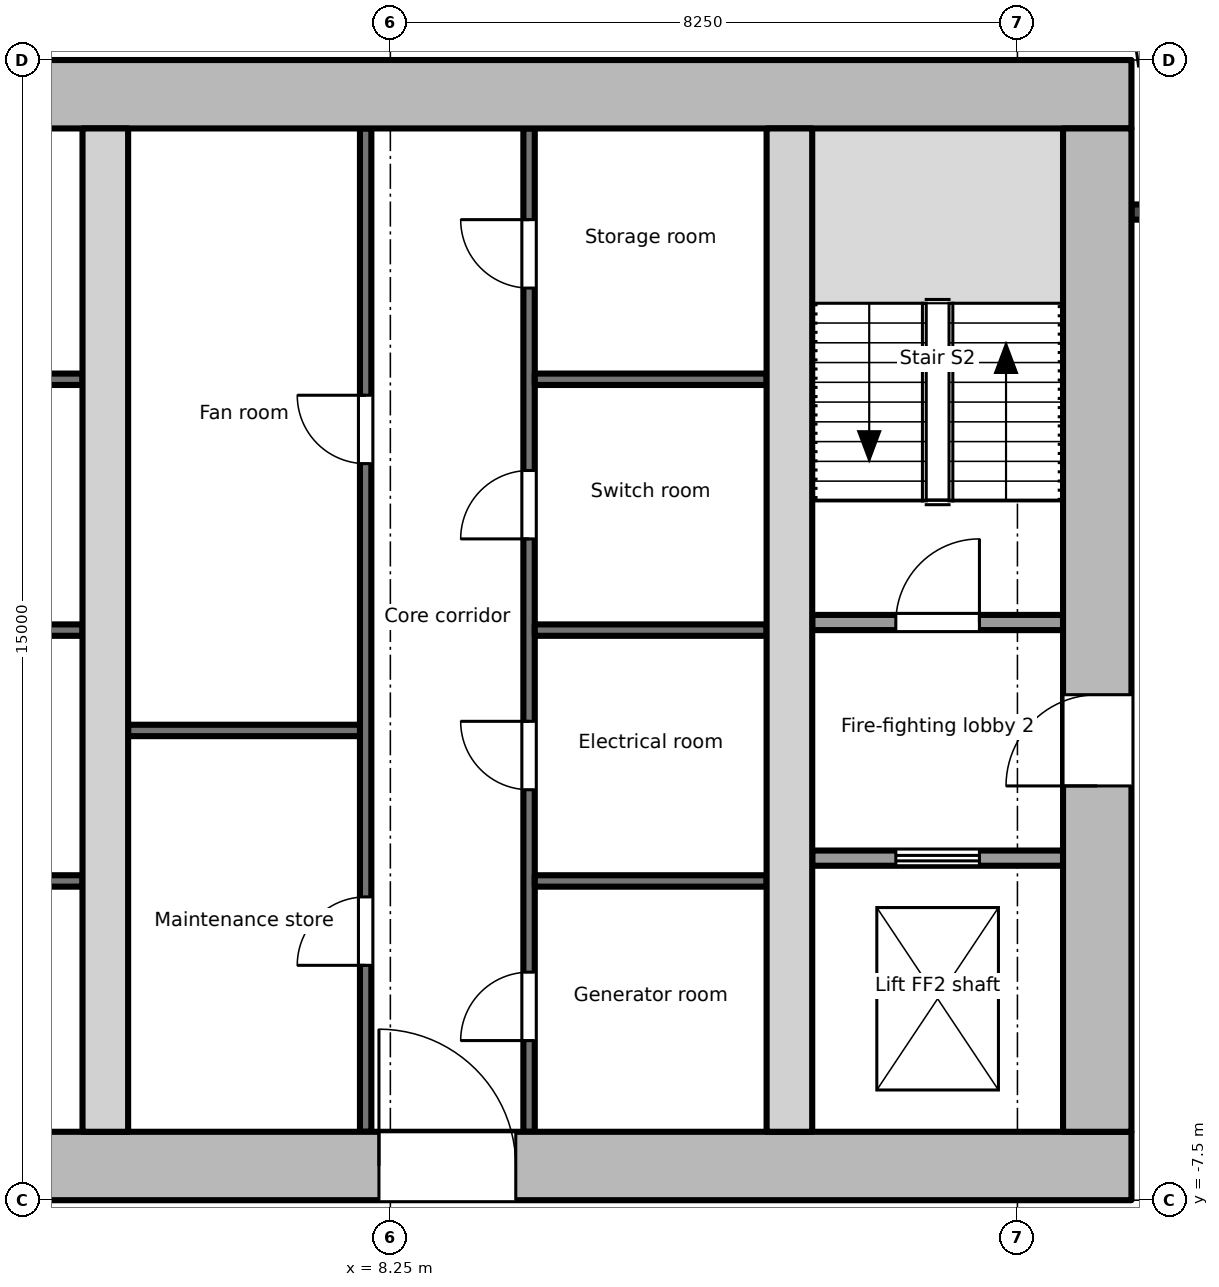
"""IFC4 building model, lengths in metres.
Left out: names, types, materials, properties, quantities, classifications, styles, units other than length and angle.
Written with IfcOpenShell. Run it as: python <this file> out.ifc"""

import sys

from ifc_helpers import new_model, si_unit, direction, frame, frame_2d, origin, place, context, subcontext, project, spatial, rectangle, extrude, element, fill, save


model = new_model("IFC4")
c1 = context("Model", 3, precision=1e-05, world=origin(), true_north=direction((0.0, 1.0)))
c2 = subcontext(c1, "Body", "Model", "MODEL_VIEW")
j1 = project(units=[si_unit("LENGTHUNIT", "METRE"), si_unit("PLANEANGLEUNIT", "RADIAN")], contexts=[c1])
p1 = place(None, origin())
s1 = spatial("IfcSite", under=j1, at=p1, CompositionType="ELEMENT")
p2 = place(p1, origin())
s2 = spatial("IfcBuilding", under=s1, at=p2, CompositionType="ELEMENT")
p3 = place(p2, frame((0.0, 0.0, 300.3)))
s3 = spatial("IfcBuildingStorey", under=s2, at=p3, CompositionType="ELEMENT", Elevation=300.3)
p4 = place(p3, frame((-18.0, -7.05, -0.2), z_axis=(0.0, 0.0, 1.0), x_axis=(1.0, 0.0, 0.0)))
e1 = element("IfcWall", 1, at=p4, inside=s3, PredefinedType="SHEAR", context=c2, shape_type="SweptSolid", body=[
    extrude(rectangle(XDim=36.0, YDim=0.9, at=frame_2d((18.0, 0.0))), origin(), (0.0, 0.0, 1.0), 4.0),
])
p5 = place(p4, frame((8.1, 0.0, 0.2)))
e2 = element("IfcOpeningElement", 2, at=p5, cuts=e1, PredefinedType="OPENING", context=c2, shape_type="SweptSolid", body=[
    extrude(rectangle(XDim=1.8, YDim=2.1, at=frame_2d((0.9, 1.05))), frame((0.0, 0.46, 0.0), z_axis=(0.0, -1.0, 0.0), x_axis=(1.0, 0.0, 0.0)), (0.0, 0.0, 1.0), 0.921),
])
p6 = place(p4, frame((17.1, 0.0, 0.2)))
e3 = element("IfcOpeningElement", 3, at=p6, cuts=e1, PredefinedType="OPENING", context=c2, shape_type="SweptSolid", body=[
    extrude(rectangle(XDim=1.8, YDim=2.1, at=frame_2d((0.9, 1.05))), frame((0.0, 0.46, 0.0), z_axis=(0.0, -1.0, 0.0), x_axis=(1.0, 0.0, 0.0)), (0.0, 0.0, 1.0), 0.921),
])
p7 = place(p4, frame((26.1, 0.0, 0.2)))
e4 = element("IfcOpeningElement", 4, at=p7, cuts=e1, PredefinedType="OPENING", context=c2, shape_type="SweptSolid", body=[
    extrude(rectangle(XDim=1.8, YDim=2.1, at=frame_2d((0.9, 1.05))), frame((0.0, 0.46, 0.0), z_axis=(0.0, -1.0, 0.0), x_axis=(1.0, 0.0, 0.0)), (0.0, 0.0, 1.0), 0.921),
])
p8 = place(p3, frame((-18.0, 7.05, -0.2), z_axis=(0.0, 0.0, 1.0), x_axis=(1.0, 0.0, 0.0)))
e5 = element("IfcWall", 5, at=p8, inside=s3, PredefinedType="SHEAR", context=c2, shape_type="SweptSolid", body=[
    extrude(rectangle(XDim=36.0, YDim=0.9, at=frame_2d((18.0, 0.0))), origin(), (0.0, 0.0, 1.0), 4.0),
])
p9 = place(p3, frame((17.55, -6.6, -0.2), z_axis=(0.0, 0.0, 1.0), x_axis=(0.0, 1.0, 0.0)))
e6 = element("IfcWall", 6, at=p9, inside=s3, PredefinedType="SHEAR", context=c2, shape_type="SweptSolid", body=[
    extrude(rectangle(XDim=13.2, YDim=0.9, at=frame_2d((6.6, 0.0))), origin(), (0.0, 0.0, 1.0), 4.0),
])
p10 = place(p9, frame((4.55, 0.0, 0.2)))
e7 = element("IfcOpeningElement", 7, at=p10, cuts=e6, PredefinedType="OPENING", context=c2, shape_type="SweptSolid", body=[
    extrude(rectangle(XDim=1.2, YDim=2.1, at=frame_2d((0.6, 1.05))), frame((0.0, 0.46, 0.0), z_axis=(0.0, -1.0, 0.0), x_axis=(1.0, 0.0, 0.0)), (0.0, 0.0, 1.0), 0.921),
])
for number, where, z_axis, x_axis in (
    (8, (4.5, -6.6, -0.2), (0.0, 0.0, 1.0), (0.0, 1.0, 0.0)),
    (9, (13.5, -6.6, -0.2), (0.0, 0.0, 1.0), (0.0, 1.0, 0.0)),
):
    element("IfcWall", number, at=place(p3, frame(where, z_axis=z_axis, x_axis=x_axis)), inside=s3, PredefinedType="SHEAR", context=c2, shape_type="SweptSolid", body=[
        extrude(rectangle(XDim=13.2, YDim=0.6, at=frame_2d((6.6, 0.0))), origin(), (0.0, 0.0, 1.0), 4.0),
    ])
p11 = place(p3, frame((13.8, -3.0, 0.0), z_axis=(0.0, 0.0, 1.0), x_axis=(1.0, 0.0, 0.0)))
e10 = element("IfcWall", 10, at=p11, inside=s3, PredefinedType="PARTITIONING", context=c2, shape_type="SweptSolid", body=[
    extrude(rectangle(XDim=3.3, YDim=0.2, at=frame_2d((1.65, 0.0))), origin(), (0.0, 0.0, 1.0), 3.8),
])
p12 = place(p11, frame((1.1, 0.0, 0.0)))
e11 = element("IfcOpeningElement", 11, at=p12, cuts=e10, PredefinedType="OPENING", context=c2, shape_type="SweptSolid", body=[
    extrude(rectangle(XDim=1.1, YDim=2.1, at=frame_2d((0.55, 1.05))), frame((0.0, 0.111, 0.0), z_axis=(0.0, -1.0, 0.0), x_axis=(1.0, 0.0, 0.0)), (0.0, 0.0, 1.0), 0.221),
])
p13 = place(p3, frame((13.8, 0.1, 0.0), z_axis=(0.0, 0.0, 1.0), x_axis=(1.0, 0.0, 0.0)))
e12 = element("IfcWall", 12, at=p13, inside=s3, PredefinedType="PARTITIONING", context=c2, shape_type="SweptSolid", body=[
    extrude(rectangle(XDim=3.3, YDim=0.2, at=frame_2d((1.65, 0.0))), origin(), (0.0, 0.0, 1.0), 3.8),
])
p14 = place(p13, frame((1.1, 0.0, 0.0)))
e13 = element("IfcOpeningElement", 13, at=p14, cuts=e12, PredefinedType="OPENING", context=c2, shape_type="SweptSolid", body=[
    extrude(rectangle(XDim=1.1, YDim=2.1, at=frame_2d((0.55, 1.05))), frame((0.0, 0.111, 0.0), z_axis=(0.0, -1.0, 0.0), x_axis=(1.0, 0.0, 0.0)), (0.0, 0.0, 1.0), 0.221),
])
for number, where, z_axis, x_axis in (
    (14, (1.15, -3.3, 0.0), (0.0, 0.0, 1.0), (1.0, 0.0, 0.0)),
    (15, (1.15, 0.0, 0.0), (0.0, 0.0, 1.0), (1.0, 0.0, 0.0)),
    (16, (1.15, 3.3, 0.0), (0.0, 0.0, 1.0), (1.0, 0.0, 0.0)),
):
    element("IfcWall", number, at=place(p3, frame(where, z_axis=z_axis, x_axis=x_axis)), inside=s3, PredefinedType="PARTITIONING", context=c2, shape_type="SweptSolid", body=[
        extrude(rectangle(XDim=3.05, YDim=0.15, at=frame_2d((1.525, 0.0))), origin(), (0.0, 0.0, 1.0), 3.8),
    ])
p15 = place(p3, frame((7.925, -6.6, 0.0), z_axis=(0.0, 0.0, 1.0), x_axis=(0.0, 1.0, 0.0)))
e17 = element("IfcWall", 17, at=p15, inside=s3, PredefinedType="PARTITIONING", context=c2, shape_type="SweptSolid", body=[
    extrude(rectangle(XDim=13.2, YDim=0.15, at=frame_2d((6.6, 0.0))), origin(), (0.0, 0.0, 1.0), 3.8),
])
p16 = place(p15, frame((2.19, 0.0, 0.0)))
e18 = element("IfcOpeningElement", 18, at=p16, cuts=e17, PredefinedType="OPENING", context=c2, shape_type="SweptSolid", body=[
    extrude(rectangle(XDim=0.9, YDim=2.1, at=frame_2d((0.45, 1.05))), frame((0.0, 0.085, 0.0), z_axis=(0.0, -1.0, 0.0), x_axis=(1.0, 0.0, 0.0)), (0.0, 0.0, 1.0), 0.171),
])
p17 = place(p15, frame((8.79, 0.0, 0.0)))
e19 = element("IfcOpeningElement", 19, at=p17, cuts=e17, PredefinedType="OPENING", context=c2, shape_type="SweptSolid", body=[
    extrude(rectangle(XDim=0.9, YDim=2.1, at=frame_2d((0.45, 1.05))), frame((0.0, 0.085, 0.0), z_axis=(0.0, -1.0, 0.0), x_axis=(1.0, 0.0, 0.0)), (0.0, 0.0, 1.0), 0.171),
])
p18 = place(p3, frame((4.8, -1.32, 0.0), z_axis=(0.0, 0.0, 1.0), x_axis=(1.0, 0.0, 0.0)))
e20 = element("IfcWall", 20, at=p18, inside=s3, PredefinedType="PARTITIONING", context=c2, shape_type="SweptSolid", body=[
    extrude(rectangle(XDim=3.05, YDim=0.15, at=frame_2d((1.525, 0.0))), origin(), (0.0, 0.0, 1.0), 3.8),
])
p19 = place(p3, frame((10.075, -6.6, 0.0), z_axis=(0.0, 0.0, 1.0), x_axis=(0.0, 1.0, 0.0)))
e21 = element("IfcWall", 21, at=p19, inside=s3, PredefinedType="PARTITIONING", context=c2, shape_type="SweptSolid", body=[
    extrude(rectangle(XDim=13.2, YDim=0.15, at=frame_2d((6.6, 0.0))), origin(), (0.0, 0.0, 1.0), 3.8),
])
p20 = place(p19, frame((1.2, 0.0, 0.0)))
e22 = element("IfcOpeningElement", 22, at=p20, cuts=e21, PredefinedType="OPENING", context=c2, shape_type="SweptSolid", body=[
    extrude(rectangle(XDim=0.9, YDim=2.1, at=frame_2d((0.45, 1.05))), frame((0.0, 0.085, 0.0), z_axis=(0.0, -1.0, 0.0), x_axis=(1.0, 0.0, 0.0)), (0.0, 0.0, 1.0), 0.171),
])
p21 = place(p19, frame((4.5, 0.0, 0.0)))
e23 = element("IfcOpeningElement", 23, at=p21, cuts=e21, PredefinedType="OPENING", context=c2, shape_type="SweptSolid", body=[
    extrude(rectangle(XDim=0.9, YDim=2.1, at=frame_2d((0.45, 1.05))), frame((0.0, 0.085, 0.0), z_axis=(0.0, -1.0, 0.0), x_axis=(1.0, 0.0, 0.0)), (0.0, 0.0, 1.0), 0.171),
])
p22 = place(p19, frame((7.8, 0.0, 0.0)))
e24 = element("IfcOpeningElement", 24, at=p22, cuts=e21, PredefinedType="OPENING", context=c2, shape_type="SweptSolid", body=[
    extrude(rectangle(XDim=0.9, YDim=2.1, at=frame_2d((0.45, 1.05))), frame((0.0, 0.085, 0.0), z_axis=(0.0, -1.0, 0.0), x_axis=(1.0, 0.0, 0.0)), (0.0, 0.0, 1.0), 0.171),
])
p23 = place(p19, frame((11.1, 0.0, 0.0)))
e25 = element("IfcOpeningElement", 25, at=p23, cuts=e21, PredefinedType="OPENING", context=c2, shape_type="SweptSolid", body=[
    extrude(rectangle(XDim=0.9, YDim=2.1, at=frame_2d((0.45, 1.05))), frame((0.0, 0.085, 0.0), z_axis=(0.0, -1.0, 0.0), x_axis=(1.0, 0.0, 0.0)), (0.0, 0.0, 1.0), 0.171),
])
for number, where, z_axis, x_axis in (
    (26, (10.15, -3.3, 0.0), (0.0, 0.0, 1.0), (1.0, 0.0, 0.0)),
    (27, (10.15, 0.0, 0.0), (0.0, 0.0, 1.0), (1.0, 0.0, 0.0)),
    (28, (10.15, 3.3, 0.0), (0.0, 0.0, 1.0), (1.0, 0.0, 0.0)),
):
    element("IfcWall", number, at=place(p3, frame(where, z_axis=z_axis, x_axis=x_axis)), inside=s3, PredefinedType="PARTITIONING", context=c2, shape_type="SweptSolid", body=[
        extrude(rectangle(XDim=3.05, YDim=0.15, at=frame_2d((1.525, 0.0))), origin(), (0.0, 0.0, 1.0), 3.8),
    ])
p24 = place(p3, frame((18.0, 5.5, 0.0), z_axis=(0.0, 0.0, 1.0), x_axis=(1.0, 0.0, 0.0)))
e29 = element("IfcWall", 29, at=p24, inside=s3, PredefinedType="PARTITIONING", context=c2, shape_type="SweptSolid", body=[
    extrude(rectangle(XDim=1.907, YDim=0.2, at=frame_2d((0.954, 0.0))), origin(), (0.0, 0.0, 1.0), 3.8),
])
p25 = place(p12, origin())
e30 = element("IfcDoor", 30, at=p25, inside=s3, OperationType="DOUBLE_DOOR_SLIDING", PredefinedType="DOOR", context=c2, shape_type="SweptSolid", body=[
    extrude(rectangle(XDim=1.1, YDim=2.1, at=frame_2d((0.55, 1.05))), frame((0.0, 0.025, 0.0), z_axis=(0.0, -1.0, 0.0), x_axis=(1.0, 0.0, 0.0)), (0.0, 0.0, 1.0), 0.05),
])
fill(e11, e30)
p26 = place(p10, origin())
e31 = element("IfcDoor", 31, at=p26, inside=s3, OperationType="SINGLE_SWING_LEFT", PredefinedType="DOOR", context=c2, shape_type="SweptSolid", body=[
    extrude(rectangle(XDim=1.2, YDim=2.1, at=frame_2d((0.6, 1.05))), frame((0.0, 0.025, 0.0), z_axis=(0.0, -1.0, 0.0), x_axis=(1.0, 0.0, 0.0)), (0.0, 0.0, 1.0), 0.05),
])
fill(e7, e31)
p27 = place(p14, origin())
e32 = element("IfcDoor", 32, at=p27, inside=s3, OperationType="SINGLE_SWING_RIGHT", PredefinedType="DOOR", context=c2, shape_type="SweptSolid", body=[
    extrude(rectangle(XDim=1.1, YDim=2.1, at=frame_2d((0.55, 1.05))), frame((0.0, 0.025, 0.0), z_axis=(0.0, -1.0, 0.0), x_axis=(1.0, 0.0, 0.0)), (0.0, 0.0, 1.0), 0.05),
])
fill(e13, e32)
p28 = place(p16, origin())
e33 = element("IfcDoor", 33, at=p28, inside=s3, OperationType="SINGLE_SWING_LEFT", PredefinedType="DOOR", context=c2, shape_type="SweptSolid", body=[
    extrude(rectangle(XDim=0.9, YDim=2.1, at=frame_2d((0.45, 1.05))), frame((0.0, 0.025, 0.0), z_axis=(0.0, -1.0, 0.0), x_axis=(1.0, 0.0, 0.0)), (0.0, 0.0, 1.0), 0.05),
])
fill(e18, e33)
p29 = place(p17, origin())
e34 = element("IfcDoor", 34, at=p29, inside=s3, OperationType="SINGLE_SWING_RIGHT", PredefinedType="DOOR", context=c2, shape_type="SweptSolid", body=[
    extrude(rectangle(XDim=0.9, YDim=2.1, at=frame_2d((0.45, 1.05))), frame((0.0, 0.025, 0.0), z_axis=(0.0, -1.0, 0.0), x_axis=(1.0, 0.0, 0.0)), (0.0, 0.0, 1.0), 0.05),
])
fill(e19, e34)
p30 = place(p20, origin())
e35 = element("IfcDoor", 35, at=p30, inside=s3, OperationType="SINGLE_SWING_LEFT", PredefinedType="DOOR", context=c2, shape_type="SweptSolid", body=[
    extrude(rectangle(XDim=0.9, YDim=2.1, at=frame_2d((0.45, 1.05))), frame((0.0, 0.025, 0.0), z_axis=(0.0, -1.0, 0.0), x_axis=(1.0, 0.0, 0.0)), (0.0, 0.0, 1.0), 0.05),
])
fill(e22, e35)
p31 = place(p21, origin())
e36 = element("IfcDoor", 36, at=p31, inside=s3, OperationType="SINGLE_SWING_RIGHT", PredefinedType="DOOR", context=c2, shape_type="SweptSolid", body=[
    extrude(rectangle(XDim=0.9, YDim=2.1, at=frame_2d((0.45, 1.05))), frame((0.0, 0.025, 0.0), z_axis=(0.0, -1.0, 0.0), x_axis=(1.0, 0.0, 0.0)), (0.0, 0.0, 1.0), 0.05),
])
fill(e23, e36)
p32 = place(p22, origin())
e37 = element("IfcDoor", 37, at=p32, inside=s3, OperationType="SINGLE_SWING_LEFT", PredefinedType="DOOR", context=c2, shape_type="SweptSolid", body=[
    extrude(rectangle(XDim=0.9, YDim=2.1, at=frame_2d((0.45, 1.05))), frame((0.0, 0.025, 0.0), z_axis=(0.0, -1.0, 0.0), x_axis=(1.0, 0.0, 0.0)), (0.0, 0.0, 1.0), 0.05),
])
fill(e24, e37)
p33 = place(p23, origin())
e38 = element("IfcDoor", 38, at=p33, inside=s3, OperationType="SINGLE_SWING_RIGHT", PredefinedType="DOOR", context=c2, shape_type="SweptSolid", body=[
    extrude(rectangle(XDim=0.9, YDim=2.1, at=frame_2d((0.45, 1.05))), frame((0.0, 0.025, 0.0), z_axis=(0.0, -1.0, 0.0), x_axis=(1.0, 0.0, 0.0)), (0.0, 0.0, 1.0), 0.05),
])
fill(e25, e38)
p34 = place(p7, origin())
e39 = element("IfcDoor", 39, at=p34, inside=s3, OperationType="SINGLE_SWING_LEFT", PredefinedType="DOOR", context=c2, shape_type="SweptSolid", body=[
    extrude(rectangle(XDim=1.8, YDim=2.1, at=frame_2d((0.9, 1.05))), frame((0.0, 0.025, 0.0), z_axis=(0.0, -1.0, 0.0), x_axis=(1.0, 0.0, 0.0)), (0.0, 0.0, 1.0), 0.05),
])
fill(e4, e39)
save(model, sys.argv[1])
